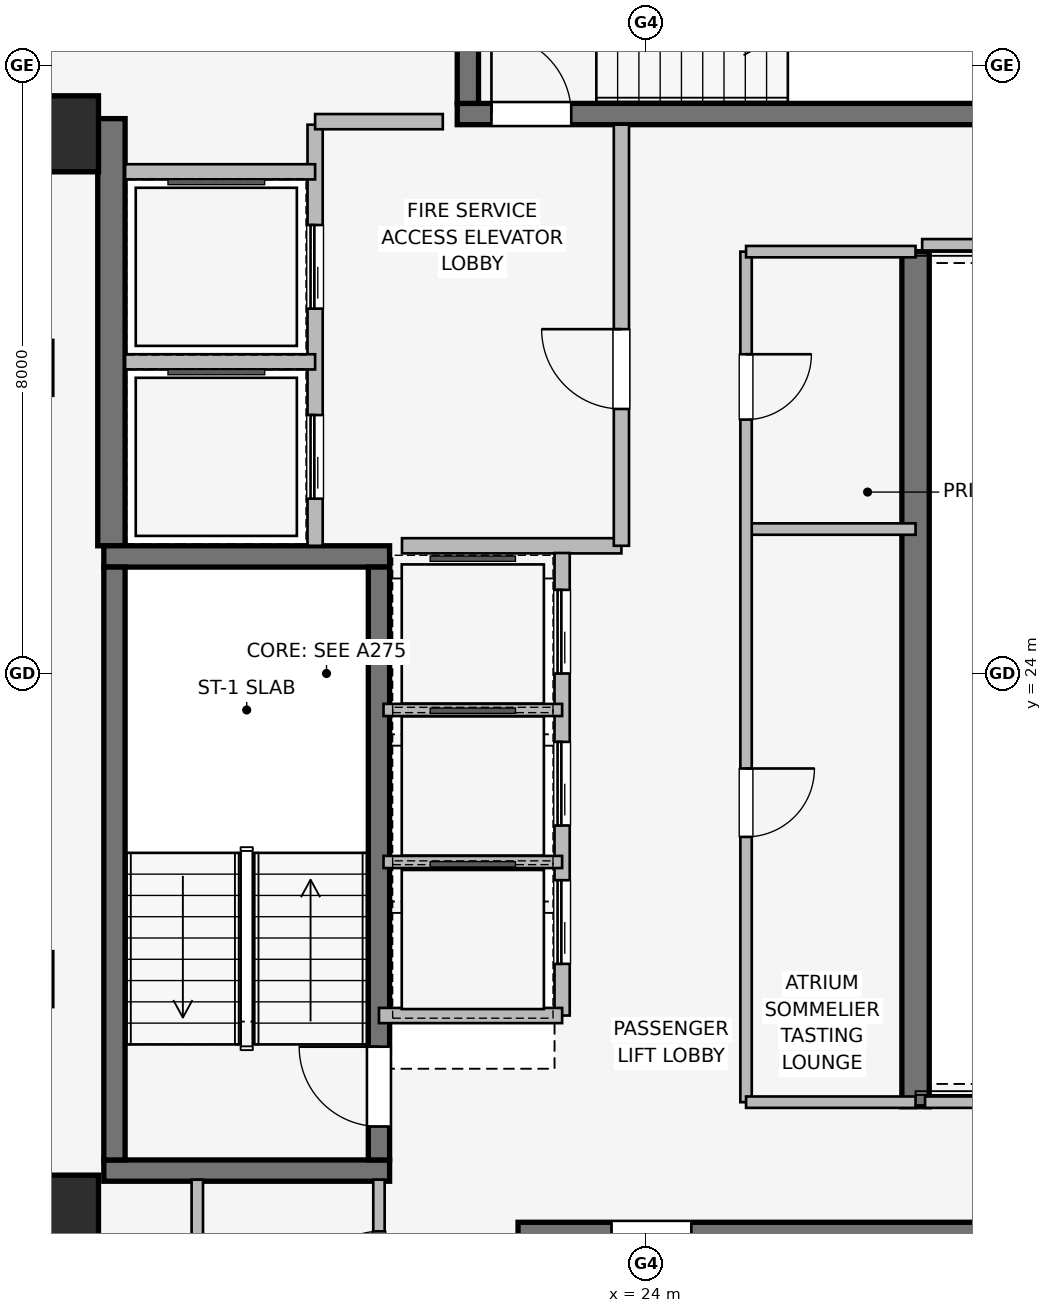
"""IFC4 building model, lengths in metres.
Left out: names, types, materials, properties, quantities, classifications, styles, units other than length and angle.
Written with IfcOpenShell. Run it as: python <this file> out.ifc"""

import sys

from ifc_helpers import new_model, si_unit, direction, frame, frame_2d, origin, origin_2d, place, context, subcontext, project, spatial, rectangle, extrude, element, fill, save


model = new_model("IFC4")
c1 = context("Model", 3, precision=1e-05, world=origin(), true_north=direction((0.0, 1.0)))
c2 = subcontext(c1, "Body", "Model", "MODEL_VIEW")
j1 = project(units=[si_unit("LENGTHUNIT", "METRE"), si_unit("PLANEANGLEUNIT", "RADIAN")], contexts=[c1])
p1 = place(None, origin())
s1 = spatial("IfcSite", under=j1, at=p1, CompositionType="ELEMENT")
p2 = place(p1, origin())
s2 = spatial("IfcBuilding", under=s1, at=p2, CompositionType="ELEMENT")
p3 = place(p2, frame((0.0, 0.0, 266.75)))
s3 = spatial("IfcBuildingStorey", under=s2, at=p3, CompositionType="ELEMENT", Elevation=266.75)
p4 = place(p3, frame((16.97, 25.68, 0.0), z_axis=(0.0, 0.0, 1.0), x_axis=(0.0, 1.0, 0.0)))
e1 = element("IfcWall", 1, at=p4, inside=s3, PredefinedType="SHEAR", context=c2, shape_type="SweptSolid", body=[
    extrude(rectangle(XDim=5.62, YDim=0.36, at=frame_2d((2.81, 0.0))), origin(), (0.0, 0.0, 1.0), 3.55),
])
p5 = place(p3, frame((27.55, 29.55, 0.0), z_axis=(0.0, 0.0, 1.0), x_axis=(0.0, -1.0, 0.0)))
e2 = element("IfcWall", 2, at=p5, inside=s3, PredefinedType="SHEAR", context=c2, shape_type="SweptSolid", body=[
    extrude(rectangle(XDim=11.25, YDim=0.36, at=frame_2d((5.625, 0.0))), origin(), (0.0, 0.0, 1.0), 3.55),
])
for number, where, z_axis, x_axis in (
    (3, (16.87, 17.46, 0.0), (0.0, 0.0, 1.0), (1.0, 0.0, 0.0)),
    (4, (20.63, 25.54, 0.0), (0.0, 0.0, 1.0), (-1.0, 0.0, 0.0)),
):
    element("IfcWall", number, at=place(p3, frame(where, z_axis=z_axis, x_axis=x_axis)), inside=s3, PredefinedType="SHEAR", context=c2, shape_type="SweptSolid", body=[
        extrude(rectangle(XDim=3.76, YDim=0.28, at=frame_2d((1.88, 0.0))), origin(), (0.0, 0.0, 1.0), 3.55),
    ])
p6 = place(p3, frame((17.01, 25.4, 0.0), z_axis=(0.0, 0.0, 1.0), x_axis=(0.0, -1.0, 0.0)))
e5 = element("IfcWall", 5, at=p6, inside=s3, PredefinedType="SHEAR", context=c2, shape_type="SweptSolid", body=[
    extrude(rectangle(XDim=7.8, YDim=0.28, at=frame_2d((3.9, 0.0))), origin(), (0.0, 0.0, 1.0), 3.55),
])
p7 = place(p3, frame((20.49, 17.6, 0.0), z_axis=(0.0, 0.0, 1.0), x_axis=(0.0, 1.0, 0.0)))
e6 = element("IfcWall", 6, at=p7, inside=s3, PredefinedType="SHEAR", context=c2, shape_type="SweptSolid", body=[
    extrude(rectangle(XDim=7.8, YDim=0.28, at=frame_2d((3.9, 0.0))), origin(), (0.0, 0.0, 1.0), 3.55),
])
p8 = place(p7, frame((0.44, 0.0, 0.0)))
e7 = element("IfcOpeningElement", 7, at=p8, cuts=e6, PredefinedType="OPENING", context=c2, shape_type="SweptSolid", body=[
    extrude(rectangle(XDim=1.05, YDim=2.0, at=frame_2d((0.525, 1.0))), frame((0.0, 0.15, 0.0), z_axis=(0.0, -1.0, 0.0), x_axis=(1.0, 0.0, 0.0)), (0.0, 0.0, 1.0), 0.3),
])
p9 = place(p3, frame((30.68, 16.64, 0.0), z_axis=(0.0, 0.0, 1.0), x_axis=(-1.0, 0.0, 0.0)))
e8 = element("IfcWall", 8, at=p9, inside=s3, PredefinedType="SHEAR", context=c2, shape_type="SweptSolid", body=[
    extrude(rectangle(XDim=8.36, YDim=0.28, at=frame_2d((4.18, 0.0))), origin(), (0.0, 0.0, 1.0), 3.55),
])
p10 = place(p9, frame((6.08, 0.0, 0.0)))
e9 = element("IfcOpeningElement", 9, at=p10, cuts=e8, PredefinedType="OPENING", context=c2, shape_type="SweptSolid", body=[
    extrude(rectangle(XDim=1.05, YDim=2.0, at=frame_2d((0.525, 1.0))), frame((0.0, 0.15, 0.0), z_axis=(0.0, -1.0, 0.0), x_axis=(1.0, 0.0, 0.0)), (0.0, 0.0, 1.0), 0.3),
])
p11 = place(p3, frame((21.52, 31.36, 0.0), z_axis=(0.0, 0.0, 1.0), x_axis=(1.0, 0.0, 0.0)))
e10 = element("IfcWall", 10, at=p11, inside=s3, PredefinedType="SHEAR", context=c2, shape_type="SweptSolid", body=[
    extrude(rectangle(XDim=8.36, YDim=0.28, at=frame_2d((4.18, 0.0))), origin(), (0.0, 0.0, 1.0), 3.55),
])
p12 = place(p11, frame((0.45, 0.0, 0.0)))
e11 = element("IfcOpeningElement", 11, at=p12, cuts=e10, PredefinedType="OPENING", context=c2, shape_type="SweptSolid", body=[
    extrude(rectangle(XDim=1.05, YDim=2.0, at=frame_2d((0.525, 1.0))), frame((0.0, 0.15, 0.0), z_axis=(0.0, -1.0, 0.0), x_axis=(1.0, 0.0, 0.0)), (0.0, 0.0, 1.0), 0.3),
])
p13 = place(p3, frame((21.66, 34.7, 0.0), z_axis=(0.0, 0.0, 1.0), x_axis=(0.0, -1.0, 0.0)))
e12 = element("IfcWall", 12, at=p13, inside=s3, PredefinedType="SHEAR", context=c2, shape_type="SweptSolid", body=[
    extrude(rectangle(XDim=3.2, YDim=0.28, at=frame_2d((1.6, 0.0))), origin(), (0.0, 0.0, 1.0), 3.55),
])
for number, where, z_axis, x_axis in (
    (13, (16.3, 16.9, 0.0), (0.0, 0.0, 1.0), (1.0, 0.0, 0.0)),
    (14, (16.3, 31.1, 0.0), (0.0, 0.0, 1.0), (1.0, 0.0, 0.0)),
):
    element("IfcColumn", number, at=place(p3, frame(where, z_axis=z_axis, x_axis=x_axis)), inside=s3, PredefinedType="COLUMN", context=c2, shape_type="SweptSolid", body=[
        extrude(rectangle(XDim=1.0, YDim=1.0, at=origin_2d()), origin(), (0.0, 0.0, 1.0), 3.55),
    ])
p14 = place(p3, frame((15.574, 32.082, 0.0), z_axis=(0.0, 0.0, 1.0), x_axis=(0.520325409202, 0.853968072318, 0.0)))
e15 = element("IfcWall", 15, at=p14, inside=s3, PredefinedType="STANDARD", context=c2, shape_type="SweptSolid", body=[
    extrude(rectangle(XDim=1.678, YDim=0.33, at=frame_2d((0.839, 0.0))), origin(), (0.0, 0.0, 1.0), 3.24),
])
p15 = place(p3, frame((19.65, 25.68, 0.0), z_axis=(0.0, 0.0, 1.0), x_axis=(0.0, 1.0, 0.0)))
e16 = element("IfcWall", 16, at=p15, inside=s3, PredefinedType="PARTITIONING", context=c2, shape_type="SweptSolid", body=[
    extrude(rectangle(XDim=5.54, YDim=0.2, at=frame_2d((2.77, 0.0))), origin(), (0.0, 0.0, 1.0), 3.24),
])
p16 = place(p15, frame((0.62, 0.0, 0.0)))
e17 = element("IfcOpeningElement", 17, at=p16, cuts=e16, PredefinedType="OPENING", context=c2, shape_type="SweptSolid", body=[
    extrude(rectangle(XDim=1.1, YDim=2.2, at=frame_2d((0.55, 1.1))), frame((0.0, 0.11, 0.0), z_axis=(0.0, -1.0, 0.0), x_axis=(1.0, 0.0, 0.0)), (0.0, 0.0, 1.0), 0.22),
])
p17 = place(p15, frame((3.12, 0.0, 0.0)))
e18 = element("IfcOpeningElement", 18, at=p17, cuts=e16, PredefinedType="OPENING", context=c2, shape_type="SweptSolid", body=[
    extrude(rectangle(XDim=1.1, YDim=2.2, at=frame_2d((0.55, 1.1))), frame((0.0, 0.11, 0.0), z_axis=(0.0, -1.0, 0.0), x_axis=(1.0, 0.0, 0.0)), (0.0, 0.0, 1.0), 0.22),
])
p18 = place(p3, frame((20.793, 25.68, 0.0), z_axis=(0.0, 0.0, 1.0), x_axis=(1.0, 0.0, 0.0)))
e19 = element("IfcWall", 19, at=p18, inside=s3, PredefinedType="PARTITIONING", context=c2, shape_type="SweptSolid", body=[
    extrude(rectangle(XDim=2.887, YDim=0.2, at=frame_2d((1.443, 0.0))), origin(), (0.0, 0.0, 1.0), 3.24),
])
p19 = place(p3, frame((23.68, 25.68, 0.0), z_axis=(0.0, 0.0, 1.0), x_axis=(0.0, 1.0, 0.0)))
e20 = element("IfcWall", 20, at=p19, inside=s3, PredefinedType="PARTITIONING", context=c2, shape_type="SweptSolid", body=[
    extrude(rectangle(XDim=5.54, YDim=0.2, at=frame_2d((2.77, 0.0))), origin(), (0.0, 0.0, 1.0), 3.24),
])
p20 = place(p19, frame((1.8, 0.0, 0.0)))
e21 = element("IfcOpeningElement", 21, at=p20, cuts=e20, PredefinedType="OPENING", context=c2, shape_type="SweptSolid", body=[
    extrude(rectangle(XDim=1.05, YDim=2.0, at=frame_2d((0.525, 1.0))), frame((0.0, 0.11, 0.0), z_axis=(0.0, -1.0, 0.0), x_axis=(1.0, 0.0, 0.0)), (0.0, 0.0, 1.0), 0.22),
])
p21 = place(p3, frame((21.33, 31.26, 0.0), z_axis=(0.0, 0.0, 1.0), x_axis=(-1.0, 0.0, 0.0)))
e22 = element("IfcWall", 22, at=p21, inside=s3, PredefinedType="PARTITIONING", context=c2, shape_type="SweptSolid", body=[
    extrude(rectangle(XDim=1.68, YDim=0.2, at=frame_2d((0.84, 0.0))), origin(), (0.0, 0.0, 1.0), 3.24),
])
p22 = place(p3, frame((17.15, 28.1, 0.0), z_axis=(0.0, 0.0, 1.0), x_axis=(1.0, 0.0, 0.0)))
e23 = element("IfcWall", 23, at=p22, inside=s3, PredefinedType="PARTITIONING", context=c2, shape_type="SweptSolid", body=[
    extrude(rectangle(XDim=2.5, YDim=0.2, at=frame_2d((1.25, 0.0))), origin(), (0.0, 0.0, 1.0), 3.24),
])
p23 = place(p3, frame((19.65, 30.6, 0.0), z_axis=(0.0, 0.0, 1.0), x_axis=(-1.0, 0.0, 0.0)))
e24 = element("IfcWall", 24, at=p23, inside=s3, PredefinedType="PARTITIONING", context=c2, shape_type="SweptSolid", body=[
    extrude(rectangle(XDim=2.5, YDim=0.2, at=frame_2d((1.25, 0.0))), origin(), (0.0, 0.0, 1.0), 2.14),
])
p24 = place(p3, frame((22.9, 19.5, 0.0), z_axis=(0.0, 0.0, 1.0), x_axis=(0.0, 1.0, 0.0)))
e25 = element("IfcWall", 25, at=p24, inside=s3, PredefinedType="PARTITIONING", context=c2, shape_type="SweptSolid", body=[
    extrude(rectangle(XDim=6.085, YDim=0.2, at=frame_2d((3.042, 0.0))), origin(), (0.0, 0.0, 1.0), 3.24),
])
p25 = place(p24, frame((0.68, 0.0, 0.0)))
e26 = element("IfcOpeningElement", 26, at=p25, cuts=e25, PredefinedType="OPENING", context=c2, shape_type="SweptSolid", body=[
    extrude(rectangle(XDim=1.1, YDim=2.2, at=frame_2d((0.55, 1.1))), frame((0.0, 0.11, 0.0), z_axis=(0.0, -1.0, 0.0), x_axis=(1.0, 0.0, 0.0)), (0.0, 0.0, 1.0), 0.22),
])
p26 = place(p24, frame((2.5, 0.0, 0.0)))
e27 = element("IfcOpeningElement", 27, at=p26, cuts=e25, PredefinedType="OPENING", context=c2, shape_type="SweptSolid", body=[
    extrude(rectangle(XDim=1.1, YDim=2.2, at=frame_2d((0.55, 1.1))), frame((0.0, 0.11, 0.0), z_axis=(0.0, -1.0, 0.0), x_axis=(1.0, 0.0, 0.0)), (0.0, 0.0, 1.0), 0.22),
])
p27 = place(p24, frame((4.5, 0.0, 0.0)))
e28 = element("IfcOpeningElement", 28, at=p27, cuts=e25, PredefinedType="OPENING", context=c2, shape_type="SweptSolid", body=[
    extrude(rectangle(XDim=1.1, YDim=2.2, at=frame_2d((0.55, 1.1))), frame((0.0, 0.11, 0.0), z_axis=(0.0, -1.0, 0.0), x_axis=(1.0, 0.0, 0.0)), (0.0, 0.0, 1.0), 0.22),
])
p28 = place(p3, frame((20.49, 19.5, 0.0), z_axis=(0.0, 0.0, 1.0), x_axis=(1.0, 0.0, 0.0)))
e29 = element("IfcWall", 29, at=p28, inside=s3, PredefinedType="PARTITIONING", context=c2, shape_type="SweptSolid", body=[
    extrude(rectangle(XDim=2.41, YDim=0.2, at=frame_2d((1.205, 0.0))), origin(), (0.0, 0.0, 1.0), 2.14),
])
for number, where, z_axis, x_axis in (
    (30, (20.55, 21.52, 0.0), (0.0, 0.0, 1.0), (1.0, 0.0, 0.0)),
    (31, (20.55, 23.52, 0.0), (0.0, 0.0, 1.0), (1.0, 0.0, 0.0)),
):
    element("IfcWall", number, at=place(p3, frame(where, z_axis=z_axis, x_axis=x_axis)), inside=s3, PredefinedType="PARTITIONING", context=c2, shape_type="SweptSolid", body=[
        extrude(rectangle(XDim=2.35, YDim=0.16, at=frame_2d((1.175, 0.0))), origin(), (0.0, 0.0, 1.0), 3.24),
    ])
p29 = place(p3, frame((25.32, 25.9, 0.0), z_axis=(0.0, 0.0, 1.0), x_axis=(1.0, 0.0, 0.0)))
e32 = element("IfcWall", 32, at=p29, inside=s3, PredefinedType="PARTITIONING", context=c2, shape_type="SweptSolid", body=[
    extrude(rectangle(XDim=2.23, YDim=0.15, at=frame_2d((1.115, 0.0))), origin(), (0.0, 0.0, 1.0), 3.24),
])
p30 = place(p3, frame((25.32, 29.55, 0.0), z_axis=(0.0, 0.0, 1.0), x_axis=(0.0, -1.0, 0.0)))
e33 = element("IfcWall", 33, at=p30, inside=s3, PredefinedType="PARTITIONING", context=c2, shape_type="SweptSolid", body=[
    extrude(rectangle(XDim=11.19, YDim=0.15, at=frame_2d((5.595, 0.0))), origin(), (0.0, 0.0, 1.0), 3.24),
])
p31 = place(p30, frame((1.35, 0.0, 0.0)))
e34 = element("IfcOpeningElement", 34, at=p31, cuts=e33, PredefinedType="OPENING", context=c2, shape_type="SweptSolid", body=[
    extrude(rectangle(XDim=0.86, YDim=2.0, at=frame_2d((0.43, 1.0))), frame((0.0, 0.085, 0.0), z_axis=(0.0, -1.0, 0.0), x_axis=(1.0, 0.0, 0.0)), (0.0, 0.0, 1.0), 0.17),
])
p32 = place(p30, frame((6.8, 0.0, 0.0)))
e35 = element("IfcOpeningElement", 35, at=p32, cuts=e33, PredefinedType="OPENING", context=c2, shape_type="SweptSolid", body=[
    extrude(rectangle(XDim=0.9, YDim=2.0, at=frame_2d((0.45, 1.0))), frame((0.0, 0.085, 0.0), z_axis=(0.0, -1.0, 0.0), x_axis=(1.0, 0.0, 0.0)), (0.0, 0.0, 1.0), 0.17),
])
p33 = place(p3, frame((25.32, 18.36, 0.0), z_axis=(0.0, 0.0, 1.0), x_axis=(1.0, 0.0, 0.0)))
e36 = element("IfcWall", 36, at=p33, inside=s3, PredefinedType="PARTITIONING", context=c2, shape_type="SweptSolid", body=[
    extrude(rectangle(XDim=2.23, YDim=0.15, at=frame_2d((1.115, 0.0))), origin(), (0.0, 0.0, 1.0), 3.24),
])
p34 = place(p3, frame((27.55, 29.55, 0.0), z_axis=(0.0, 0.0, 1.0), x_axis=(-1.0, 0.0, 0.0)))
e37 = element("IfcWall", 37, at=p34, inside=s3, PredefinedType="PARTITIONING", context=c2, shape_type="SweptSolid", body=[
    extrude(rectangle(XDim=2.23, YDim=0.15, at=frame_2d((1.115, 0.0))), origin(), (0.0, 0.0, 1.0), 2.14),
])
p35 = place(p3, frame((18.1, 17.34, 0.0), z_axis=(0.0, 0.0, 1.0), x_axis=(0.0, -1.0, 0.0)))
e38 = element("IfcWall", 38, at=p35, inside=s3, PredefinedType="PARTITIONING", context=c2, shape_type="SweptSolid", body=[
    extrude(rectangle(XDim=4.133, YDim=0.15, at=frame_2d((2.066, 0.0))), origin(), (0.0, 0.0, 1.0), 3.24),
])
p36 = place(p3, frame((20.49, 13.2, 0.0), z_axis=(0.0, 0.0, 1.0), x_axis=(0.0, 1.0, 0.0)))
e39 = element("IfcWall", 39, at=p36, inside=s3, PredefinedType="PARTITIONING", context=c2, shape_type="SweptSolid", body=[
    extrude(rectangle(XDim=4.14, YDim=0.15, at=frame_2d((2.07, 0.0))), origin(), (0.0, 0.0, 1.0), 3.24),
])
p37 = place(p36, frame((0.45, 0.0, 0.0)))
e40 = element("IfcOpeningElement", 40, at=p37, cuts=e39, PredefinedType="OPENING", context=c2, shape_type="SweptSolid", body=[
    extrude(rectangle(XDim=0.86, YDim=2.0, at=frame_2d((0.43, 1.0))), frame((0.0, 0.085, 0.0), z_axis=(0.0, -1.0, 0.0), x_axis=(1.0, 0.0, 0.0)), (0.0, 0.0, 1.0), 0.17),
])
p38 = place(p36, frame((2.6, 0.0, 0.0)))
e41 = element("IfcOpeningElement", 41, at=p38, cuts=e39, PredefinedType="OPENING", context=c2, shape_type="SweptSolid", body=[
    extrude(rectangle(XDim=0.86, YDim=2.0, at=frame_2d((0.43, 1.0))), frame((0.0, 0.085, 0.0), z_axis=(0.0, -1.0, 0.0), x_axis=(1.0, 0.0, 0.0)), (0.0, 0.0, 1.0), 0.17),
])
p39 = place(p3, frame((27.675, 18.36, 0.0), z_axis=(0.0, 0.0, 1.0), x_axis=(1.0, 0.0, 0.0)))
e42 = element("IfcWall", 42, at=p39, inside=s3, PredefinedType="PARTITIONING", context=c2, shape_type="SweptSolid", body=[
    extrude(rectangle(XDim=12.165, YDim=0.15, at=frame_2d((6.083, 0.0))), origin(), (0.0, 0.0, 1.0), 2.381),
])
p40 = place(p3, frame((39.84, 29.64, 0.0), z_axis=(0.0, 0.0, 1.0), x_axis=(-1.0, 0.0, 0.0)))
e43 = element("IfcWall", 43, at=p40, inside=s3, PredefinedType="PARTITIONING", context=c2, shape_type="SweptSolid", body=[
    extrude(rectangle(XDim=12.203, YDim=0.15, at=frame_2d((6.102, 0.0))), origin(), (0.0, 0.0, 1.0), 2.381),
])
p41 = place(p8, origin())
e44 = element("IfcDoor", 44, at=p41, inside=s3, OperationType="SINGLE_SWING_RIGHT", PredefinedType="DOOR", context=c2, shape_type="SweptSolid", body=[
    extrude(rectangle(XDim=1.05, YDim=2.0, at=frame_2d((0.525, 1.0))), frame((0.0, 0.025, 0.0), z_axis=(0.0, -1.0, 0.0), x_axis=(1.0, 0.0, 0.0)), (0.0, 0.0, 1.0), 0.05),
])
fill(e7, e44)
p42 = place(p10, origin())
e45 = element("IfcDoor", 45, at=p42, inside=s3, OperationType="SINGLE_SWING_RIGHT", PredefinedType="DOOR", context=c2, shape_type="SweptSolid", body=[
    extrude(rectangle(XDim=1.05, YDim=2.0, at=frame_2d((0.525, 1.0))), frame((0.0, 0.025, 0.0), z_axis=(0.0, -1.0, 0.0), x_axis=(1.0, 0.0, 0.0)), (0.0, 0.0, 1.0), 0.05),
])
fill(e9, e45)
p43 = place(p12, origin())
e46 = element("IfcDoor", 46, at=p43, inside=s3, OperationType="SINGLE_SWING_LEFT", PredefinedType="DOOR", context=c2, shape_type="SweptSolid", body=[
    extrude(rectangle(XDim=1.05, YDim=2.0, at=frame_2d((0.525, 1.0))), frame((0.0, 0.025, 0.0), z_axis=(0.0, -1.0, 0.0), x_axis=(1.0, 0.0, 0.0)), (0.0, 0.0, 1.0), 0.05),
])
fill(e11, e46)
p44 = place(p16, origin())
e47 = element("IfcDoor", 47, at=p44, inside=s3, OperationType="SLIDING_TO_LEFT", PredefinedType="DOOR", context=c2, shape_type="SweptSolid", body=[
    extrude(rectangle(XDim=1.1, YDim=2.2, at=frame_2d((0.55, 1.1))), frame((0.0, 0.025, 0.0), z_axis=(0.0, -1.0, 0.0), x_axis=(1.0, 0.0, 0.0)), (0.0, 0.0, 1.0), 0.05),
])
fill(e17, e47)
p45 = place(p17, origin())
e48 = element("IfcDoor", 48, at=p45, inside=s3, OperationType="SLIDING_TO_LEFT", PredefinedType="DOOR", context=c2, shape_type="SweptSolid", body=[
    extrude(rectangle(XDim=1.1, YDim=2.2, at=frame_2d((0.55, 1.1))), frame((0.0, 0.025, 0.0), z_axis=(0.0, -1.0, 0.0), x_axis=(1.0, 0.0, 0.0)), (0.0, 0.0, 1.0), 0.05),
])
fill(e18, e48)
p46 = place(p20, origin())
e49 = element("IfcDoor", 49, at=p46, inside=s3, OperationType="SINGLE_SWING_RIGHT", PredefinedType="DOOR", context=c2, shape_type="SweptSolid", body=[
    extrude(rectangle(XDim=1.05, YDim=2.0, at=frame_2d((0.525, 1.0))), frame((0.0, 0.025, 0.0), z_axis=(0.0, -1.0, 0.0), x_axis=(1.0, 0.0, 0.0)), (0.0, 0.0, 1.0), 0.05),
])
fill(e21, e49)
p47 = place(p25, origin())
e50 = element("IfcDoor", 50, at=p47, inside=s3, OperationType="SLIDING_TO_LEFT", PredefinedType="DOOR", context=c2, shape_type="SweptSolid", body=[
    extrude(rectangle(XDim=1.1, YDim=2.2, at=frame_2d((0.55, 1.1))), frame((0.0, 0.025, 0.0), z_axis=(0.0, -1.0, 0.0), x_axis=(1.0, 0.0, 0.0)), (0.0, 0.0, 1.0), 0.05),
])
fill(e26, e50)
p48 = place(p26, origin())
e51 = element("IfcDoor", 51, at=p48, inside=s3, OperationType="SLIDING_TO_LEFT", PredefinedType="DOOR", context=c2, shape_type="SweptSolid", body=[
    extrude(rectangle(XDim=1.1, YDim=2.2, at=frame_2d((0.55, 1.1))), frame((0.0, 0.025, 0.0), z_axis=(0.0, -1.0, 0.0), x_axis=(1.0, 0.0, 0.0)), (0.0, 0.0, 1.0), 0.05),
])
fill(e27, e51)
p49 = place(p27, origin())
e52 = element("IfcDoor", 52, at=p49, inside=s3, OperationType="SLIDING_TO_LEFT", PredefinedType="DOOR", context=c2, shape_type="SweptSolid", body=[
    extrude(rectangle(XDim=1.1, YDim=2.2, at=frame_2d((0.55, 1.1))), frame((0.0, 0.025, 0.0), z_axis=(0.0, -1.0, 0.0), x_axis=(1.0, 0.0, 0.0)), (0.0, 0.0, 1.0), 0.05),
])
fill(e28, e52)
p50 = place(p31, origin())
e53 = element("IfcDoor", 53, at=p50, inside=s3, OperationType="SINGLE_SWING_LEFT", PredefinedType="DOOR", context=c2, shape_type="SweptSolid", body=[
    extrude(rectangle(XDim=0.86, YDim=2.0, at=frame_2d((0.43, 1.0))), frame((0.0, 0.025, 0.0), z_axis=(0.0, -1.0, 0.0), x_axis=(1.0, 0.0, 0.0)), (0.0, 0.0, 1.0), 0.05),
])
fill(e34, e53)
p51 = place(p32, origin())
e54 = element("IfcDoor", 54, at=p51, inside=s3, OperationType="SINGLE_SWING_LEFT", PredefinedType="DOOR", context=c2, shape_type="SweptSolid", body=[
    extrude(rectangle(XDim=0.9, YDim=2.0, at=frame_2d((0.45, 1.0))), frame((0.0, 0.025, 0.0), z_axis=(0.0, -1.0, 0.0), x_axis=(1.0, 0.0, 0.0)), (0.0, 0.0, 1.0), 0.05),
])
fill(e35, e54)
p52 = place(p38, origin())
e55 = element("IfcDoor", 55, at=p52, inside=s3, OperationType="SINGLE_SWING_LEFT", PredefinedType="DOOR", context=c2, shape_type="SweptSolid", body=[
    extrude(rectangle(XDim=0.86, YDim=2.0, at=frame_2d((0.43, 1.0))), frame((0.0, 0.025, 0.0), z_axis=(0.0, -1.0, 0.0), x_axis=(1.0, 0.0, 0.0)), (0.0, 0.0, 1.0), 0.05),
])
fill(e41, e55)
save(model, sys.argv[1])
